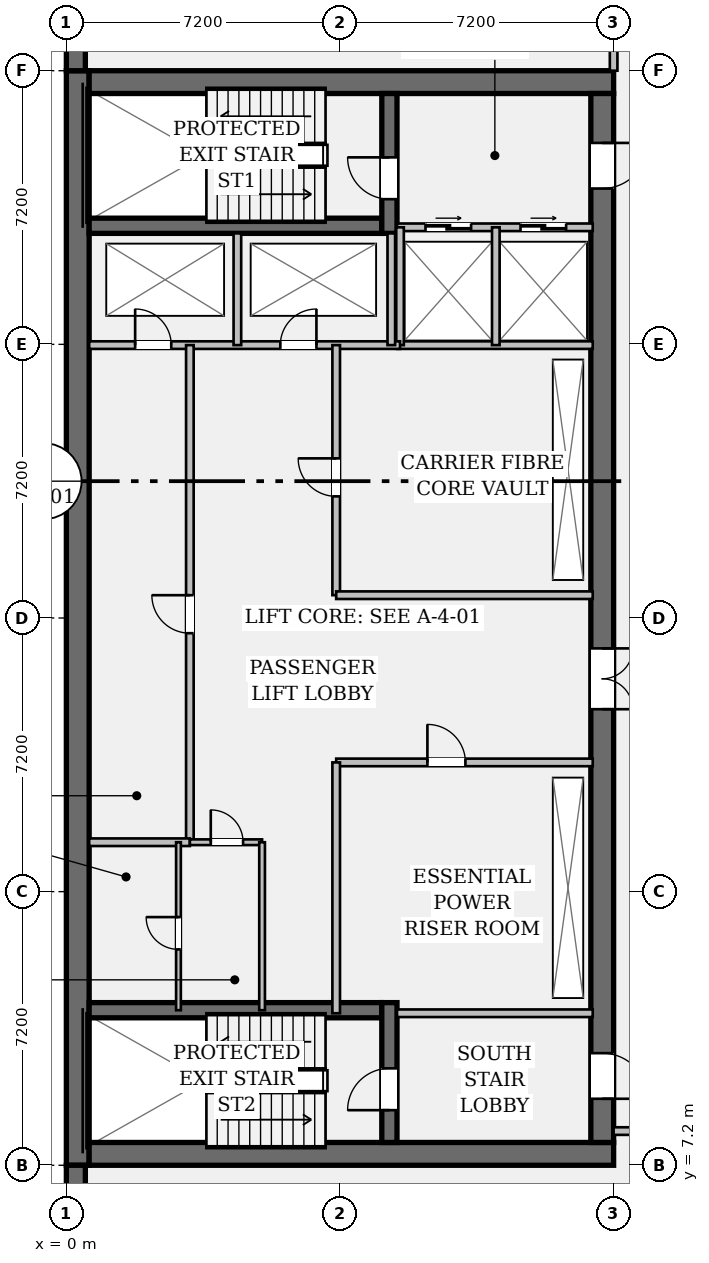
"""IFC4 building model, lengths in metres.
Left out: names, types, materials, properties, quantities, classifications, styles, units other than length and angle.
Written with IfcOpenShell. Run it as: python <this file> out.ifc"""

import sys

from ifc_helpers import new_model, si_unit, direction, frame, frame_2d, origin, place, context, subcontext, project, spatial, rectangle, extrude, element, fill, save


model = new_model("IFC4")
c1 = context("Model", 3, precision=1e-05, world=origin(), true_north=direction((0.0, 1.0)))
c2 = subcontext(c1, "Body", "Model", "MODEL_VIEW")
j1 = project(units=[si_unit("LENGTHUNIT", "METRE"), si_unit("PLANEANGLEUNIT", "RADIAN")], contexts=[c1])
p1 = place(None, origin())
s1 = spatial("IfcSite", under=j1, at=p1, CompositionType="ELEMENT")
p2 = place(p1, origin())
s2 = spatial("IfcBuilding", under=s1, at=p2, CompositionType="ELEMENT")
p3 = place(p2, frame((0.0, 0.0, -4.55)))
s3 = spatial("IfcBuildingStorey", under=s2, at=p3, CompositionType="ELEMENT", Elevation=-4.55)
p4 = place(p3, frame((0.3, 7.2, 0.0), z_axis=(0.0, 0.0, 1.0), x_axis=(0.0, 1.0, 0.0)))
e1 = element("IfcWall", 1, at=p4, inside=s3, PredefinedType="SHEAR", context=c2, shape_type="SweptSolid", body=[
    extrude(rectangle(XDim=28.8, YDim=0.6, at=frame_2d((14.4, 0.0))), origin(), (0.0, 0.0, 1.0), 4.25),
])
for number, where, z_axis, x_axis in (
    (2, (0.6, 7.5, 0.0), (0.0, 0.0, 1.0), (1.0, 0.0, 0.0)),
    (3, (0.6, 35.7, 0.0), (0.0, 0.0, 1.0), (1.0, 0.0, 0.0)),
):
    element("IfcWall", number, at=place(p3, frame(where, z_axis=z_axis, x_axis=x_axis)), inside=s3, PredefinedType="SHEAR", context=c2, shape_type="SweptSolid", body=[
        extrude(rectangle(XDim=13.8, YDim=0.6, at=frame_2d((6.9, 0.0))), origin(), (0.0, 0.0, 1.0), 4.25),
    ])
p5 = place(p3, frame((14.1, 35.4, 0.0), z_axis=(0.0, 0.0, 1.0), x_axis=(0.0, -1.0, 0.0)))
e4 = element("IfcWall", 4, at=p5, inside=s3, PredefinedType="SHEAR", context=c2, shape_type="SweptSolid", body=[
    extrude(rectangle(XDim=27.6, YDim=0.6, at=frame_2d((13.8, 0.0))), origin(), (0.0, 0.0, 1.0), 4.25),
])
p6 = place(p5, frame((1.3, 0.0, 0.0)))
e5 = element("IfcOpeningElement", 5, at=p6, cuts=e4, PredefinedType="OPENING", context=c2, shape_type="SweptSolid", body=[
    extrude(rectangle(XDim=1.2, YDim=2.15, at=frame_2d((0.6, 1.075))), frame((0.0, 0.312, 0.0), z_axis=(0.0, -1.0, 0.0), x_axis=(1.0, 0.0, 0.0)), (0.0, 0.0, 1.0), 0.624),
])
p7 = place(p5, frame((25.25, 0.0, 0.0)))
e6 = element("IfcOpeningElement", 6, at=p7, cuts=e4, PredefinedType="OPENING", context=c2, shape_type="SweptSolid", body=[
    extrude(rectangle(XDim=1.2, YDim=2.15, at=frame_2d((0.6, 1.075))), frame((0.0, 0.312, 0.0), z_axis=(0.0, -1.0, 0.0), x_axis=(1.0, 0.0, 0.0)), (0.0, 0.0, 1.0), 0.624),
])
p8 = place(p5, frame((14.6, 0.0, 0.0)))
e7 = element("IfcOpeningElement", 7, at=p8, cuts=e4, PredefinedType="OPENING", context=c2, shape_type="SweptSolid", body=[
    extrude(rectangle(XDim=1.6, YDim=2.2, at=frame_2d((0.8, 1.1))), frame((0.0, 0.312, 0.0), z_axis=(0.0, -1.0, 0.0), x_axis=(1.0, 0.0, 0.0)), (0.0, 0.0, 1.0), 0.624),
])
for number, where, z_axis, x_axis in (
    (8, (0.6, 31.92, 0.0), (0.0, 0.0, 1.0), (1.0, 0.0, 0.0)),
    (9, (0.6, 11.28, 0.0), (0.0, 0.0, 1.0), (1.0, 0.0, 0.0)),
):
    element("IfcWall", number, at=place(p3, frame(where, z_axis=z_axis, x_axis=x_axis)), inside=s3, PredefinedType="SHEAR", context=c2, shape_type="SweptSolid", body=[
        extrude(rectangle(XDim=7.7, YDim=0.4, at=frame_2d((3.85, 0.0))), origin(), (0.0, 0.0, 1.0), 4.25),
    ])
p9 = place(p3, frame((8.5, 31.72, 0.0), z_axis=(0.0, 0.0, 1.0), x_axis=(0.0, 1.0, 0.0)))
e10 = element("IfcWall", 10, at=p9, inside=s3, PredefinedType="SHEAR", context=c2, shape_type="SweptSolid", body=[
    extrude(rectangle(XDim=3.68, YDim=0.4, at=frame_2d((1.84, 0.0))), origin(), (0.0, 0.0, 1.0), 4.25),
])
p10 = place(p9, frame((0.9, 0.0, 0.0)))
e11 = element("IfcOpeningElement", 11, at=p10, cuts=e10, PredefinedType="OPENING", context=c2, shape_type="SweptSolid", body=[
    extrude(rectangle(XDim=1.1, YDim=2.15, at=frame_2d((0.55, 1.075))), frame((0.0, 0.212, 0.0), z_axis=(0.0, -1.0, 0.0), x_axis=(1.0, 0.0, 0.0)), (0.0, 0.0, 1.0), 0.424),
])
p11 = place(p3, frame((8.5, 7.8, 0.0), z_axis=(0.0, 0.0, 1.0), x_axis=(0.0, 1.0, 0.0)))
e12 = element("IfcWall", 12, at=p11, inside=s3, PredefinedType="SHEAR", context=c2, shape_type="SweptSolid", body=[
    extrude(rectangle(XDim=3.68, YDim=0.4, at=frame_2d((1.84, 0.0))), origin(), (0.0, 0.0, 1.0), 4.25),
])
p12 = place(p11, frame((0.85, 0.0, 0.0)))
e13 = element("IfcOpeningElement", 13, at=p12, cuts=e12, PredefinedType="OPENING", context=c2, shape_type="SweptSolid", body=[
    extrude(rectangle(XDim=1.1, YDim=2.15, at=frame_2d((0.55, 1.075))), frame((0.0, 0.212, 0.0), z_axis=(0.0, -1.0, 0.0), x_axis=(1.0, 0.0, 0.0)), (0.0, 0.0, 1.0), 0.424),
])
p13 = place(p3, frame((0.25, 3.2, 0.0), z_axis=(0.0, 0.0, 1.0), x_axis=(0.0, 1.0, 0.0)))
e14 = element("IfcWall", 14, at=p13, inside=s3, PredefinedType="SOLIDWALL", context=c2, shape_type="SweptSolid", body=[
    extrude(rectangle(XDim=4.0, YDim=0.5, at=frame_2d((2.0, 0.0))), origin(), (0.0, 0.0, 1.0), 4.25),
])
p14 = place(p3, frame((0.25, 36.0, 0.0), z_axis=(0.0, 0.0, 1.0), x_axis=(0.0, 1.0, 0.0)))
e15 = element("IfcWall", 15, at=p14, inside=s3, PredefinedType="SOLIDWALL", context=c2, shape_type="SweptSolid", body=[
    extrude(rectangle(XDim=11.2, YDim=0.5, at=frame_2d((5.6, 0.0))), origin(), (0.0, 0.0, 1.0), 4.25),
])
p15 = place(p3, frame((8.7, 31.88, 0.0), z_axis=(0.0, 0.0, 1.0), x_axis=(1.0, 0.0, 0.0)))
e16 = element("IfcWall", 16, at=p15, inside=s3, PredefinedType="PARTITIONING", context=c2, shape_type="SweptSolid", body=[
    extrude(rectangle(XDim=5.15, YDim=0.2, at=frame_2d((2.575, 0.0))), origin(), (0.0, 0.0, 1.0), 4.25),
])
p16 = place(p15, frame((0.75, 0.0, 0.0)))
e17 = element("IfcOpeningElement", 17, at=p16, cuts=e16, PredefinedType="OPENING", context=c2, shape_type="SweptSolid", body=[
    extrude(rectangle(XDim=1.2, YDim=2.2, at=frame_2d((0.6, 1.1))), frame((0.0, 0.112, 0.0), z_axis=(0.0, -1.0, 0.0), x_axis=(1.0, 0.0, 0.0)), (0.0, 0.0, 1.0), 0.224),
])
p17 = place(p15, frame((3.25, 0.0, 0.0)))
e18 = element("IfcOpeningElement", 18, at=p17, cuts=e16, PredefinedType="OPENING", context=c2, shape_type="SweptSolid", body=[
    extrude(rectangle(XDim=1.2, YDim=2.2, at=frame_2d((0.6, 1.1))), frame((0.0, 0.112, 0.0), z_axis=(0.0, -1.0, 0.0), x_axis=(1.0, 0.0, 0.0)), (0.0, 0.0, 1.0), 0.224),
])
for number, where, z_axis, x_axis in (
    (19, (8.7, 11.2, 0.0), (0.0, 0.0, 1.0), (1.0, 0.0, 0.0)),
    (20, (8.7, 28.78, 0.0), (0.0, 0.0, 1.0), (1.0, 0.0, 0.0)),
):
    element("IfcWall", number, at=place(p3, frame(where, z_axis=z_axis, x_axis=x_axis)), inside=s3, PredefinedType="PARTITIONING", context=c2, shape_type="SweptSolid", body=[
        extrude(rectangle(XDim=5.15, YDim=0.2, at=frame_2d((2.575, 0.0))), origin(), (0.0, 0.0, 1.0), 4.25),
    ])
for number, where, z_axis, x_axis in (
    (21, (8.78, 28.78, 0.0), (0.0, 0.0, 1.0), (0.0, 1.0, 0.0)),
    (22, (11.3, 28.78, 0.0), (0.0, 0.0, 1.0), (0.0, 1.0, 0.0)),
):
    element("IfcWall", number, at=place(p3, frame(where, z_axis=z_axis, x_axis=x_axis)), inside=s3, PredefinedType="PARTITIONING", context=c2, shape_type="SweptSolid", body=[
        extrude(rectangle(XDim=3.1, YDim=0.2, at=frame_2d((1.55, 0.0))), origin(), (0.0, 0.0, 1.0), 4.25),
    ])
p18 = place(p3, frame((0.6, 28.78, 0.0), z_axis=(0.0, 0.0, 1.0), x_axis=(1.0, 0.0, 0.0)))
e23 = element("IfcWall", 23, at=p18, inside=s3, PredefinedType="PARTITIONING", context=c2, shape_type="SweptSolid", body=[
    extrude(rectangle(XDim=8.18, YDim=0.2, at=frame_2d((4.09, 0.0))), origin(), (0.0, 0.0, 1.0), 4.25),
])
p19 = place(p18, frame((1.21, 0.0, 0.0)))
e24 = element("IfcOpeningElement", 24, at=p19, cuts=e23, PredefinedType="OPENING", context=c2, shape_type="SweptSolid", body=[
    extrude(rectangle(XDim=0.95, YDim=2.15, at=frame_2d((0.475, 1.075))), frame((0.0, 0.112, 0.0), z_axis=(0.0, -1.0, 0.0), x_axis=(1.0, 0.0, 0.0)), (0.0, 0.0, 1.0), 0.224),
])
p20 = place(p18, frame((5.03, 0.0, 0.0)))
e25 = element("IfcOpeningElement", 25, at=p20, cuts=e23, PredefinedType="OPENING", context=c2, shape_type="SweptSolid", body=[
    extrude(rectangle(XDim=0.95, YDim=2.15, at=frame_2d((0.475, 1.075))), frame((0.0, 0.112, 0.0), z_axis=(0.0, -1.0, 0.0), x_axis=(1.0, 0.0, 0.0)), (0.0, 0.0, 1.0), 0.224),
])
for number, where, z_axis, x_axis in (
    (26, (4.5, 28.78, 0.0), (0.0, 0.0, 1.0), (0.0, 1.0, 0.0)),
    (27, (8.55, 28.78, 0.0), (0.0, 0.0, 1.0), (0.0, 1.0, 0.0)),
):
    element("IfcWall", number, at=place(p3, frame(where, z_axis=z_axis, x_axis=x_axis)), inside=s3, PredefinedType="PARTITIONING", context=c2, shape_type="SweptSolid", body=[
        extrude(rectangle(XDim=2.94, YDim=0.2, at=frame_2d((1.47, 0.0))), origin(), (0.0, 0.0, 1.0), 4.25),
    ])
p21 = place(p3, frame((3.25, 15.7, 0.0), z_axis=(0.0, 0.0, 1.0), x_axis=(0.0, 1.0, 0.0)))
e28 = element("IfcWall", 28, at=p21, inside=s3, PredefinedType="PARTITIONING", context=c2, shape_type="SweptSolid", body=[
    extrude(rectangle(XDim=13.08, YDim=0.2, at=frame_2d((6.54, 0.0))), origin(), (0.0, 0.0, 1.0), 4.25),
])
p22 = place(p21, frame((5.5, 0.0, 0.0)))
e29 = element("IfcOpeningElement", 29, at=p22, cuts=e28, PredefinedType="OPENING", context=c2, shape_type="SweptSolid", body=[
    extrude(rectangle(XDim=1.0, YDim=2.15, at=frame_2d((0.5, 1.075))), frame((0.0, 0.112, 0.0), z_axis=(0.0, -1.0, 0.0), x_axis=(1.0, 0.0, 0.0)), (0.0, 0.0, 1.0), 0.224),
])
p23 = place(p3, frame((0.6, 15.7, 0.0), z_axis=(0.0, 0.0, 1.0), x_axis=(1.0, 0.0, 0.0)))
e30 = element("IfcWall", 30, at=p23, inside=s3, PredefinedType="PARTITIONING", context=c2, shape_type="SweptSolid", body=[
    extrude(rectangle(XDim=2.65, YDim=0.2, at=frame_2d((1.325, 0.0))), origin(), (0.0, 0.0, 1.0), 4.25),
])
p24 = place(p3, frame((7.1, 22.2, 0.0), z_axis=(0.0, 0.0, 1.0), x_axis=(0.0, 1.0, 0.0)))
e31 = element("IfcWall", 31, at=p24, inside=s3, PredefinedType="PARTITIONING", context=c2, shape_type="SweptSolid", body=[
    extrude(rectangle(XDim=6.58, YDim=0.2, at=frame_2d((3.29, 0.0))), origin(), (0.0, 0.0, 1.0), 4.25),
])
p25 = place(p24, frame((2.6, 0.0, 0.0)))
e32 = element("IfcOpeningElement", 32, at=p25, cuts=e31, PredefinedType="OPENING", context=c2, shape_type="SweptSolid", body=[
    extrude(rectangle(XDim=1.0, YDim=2.15, at=frame_2d((0.5, 1.075))), frame((0.0, 0.112, 0.0), z_axis=(0.0, -1.0, 0.0), x_axis=(1.0, 0.0, 0.0)), (0.0, 0.0, 1.0), 0.224),
])
p26 = place(p3, frame((7.1, 22.2, 0.0), z_axis=(0.0, 0.0, 1.0), x_axis=(1.0, 0.0, 0.0)))
e33 = element("IfcWall", 33, at=p26, inside=s3, PredefinedType="PARTITIONING", context=c2, shape_type="SweptSolid", body=[
    extrude(rectangle(XDim=6.75, YDim=0.2, at=frame_2d((3.375, 0.0))), origin(), (0.0, 0.0, 1.0), 4.25),
])
p27 = place(p3, frame((7.1, 17.8, 0.0), z_axis=(0.0, 0.0, 1.0), x_axis=(1.0, 0.0, 0.0)))
e34 = element("IfcWall", 34, at=p27, inside=s3, PredefinedType="PARTITIONING", context=c2, shape_type="SweptSolid", body=[
    extrude(rectangle(XDim=6.75, YDim=0.2, at=frame_2d((3.375, 0.0))), origin(), (0.0, 0.0, 1.0), 4.25),
])
p28 = place(p27, frame((2.4, 0.0, 0.0)))
e35 = element("IfcOpeningElement", 35, at=p28, cuts=e34, PredefinedType="OPENING", context=c2, shape_type="SweptSolid", body=[
    extrude(rectangle(XDim=1.0, YDim=2.15, at=frame_2d((0.5, 1.075))), frame((0.0, 0.112, 0.0), z_axis=(0.0, -1.0, 0.0), x_axis=(1.0, 0.0, 0.0)), (0.0, 0.0, 1.0), 0.224),
])
p29 = place(p3, frame((7.1, 11.2, 0.0), z_axis=(0.0, 0.0, 1.0), x_axis=(0.0, 1.0, 0.0)))
e36 = element("IfcWall", 36, at=p29, inside=s3, PredefinedType="PARTITIONING", context=c2, shape_type="SweptSolid", body=[
    extrude(rectangle(XDim=6.6, YDim=0.2, at=frame_2d((3.3, 0.0))), origin(), (0.0, 0.0, 1.0), 4.25),
])
p30 = place(p3, frame((3.25, 15.7, 0.0), z_axis=(0.0, 0.0, 1.0), x_axis=(1.0, 0.0, 0.0)))
e37 = element("IfcWall", 37, at=p30, inside=s3, PredefinedType="PARTITIONING", context=c2, shape_type="SweptSolid", body=[
    extrude(rectangle(XDim=1.9, YDim=0.15, at=frame_2d((0.95, 0.0))), origin(), (0.0, 0.0, 1.0), 4.25),
])
p31 = place(p30, frame((0.55, 0.0, 0.0)))
e38 = element("IfcOpeningElement", 38, at=p31, cuts=e37, PredefinedType="OPENING", context=c2, shape_type="SweptSolid", body=[
    extrude(rectangle(XDim=0.85, YDim=2.15, at=frame_2d((0.425, 1.075))), frame((0.0, 0.087, 0.0), z_axis=(0.0, -1.0, 0.0), x_axis=(1.0, 0.0, 0.0)), (0.0, 0.0, 1.0), 0.174),
])
p32 = place(p3, frame((5.15, 11.28, 0.0), z_axis=(0.0, 0.0, 1.0), x_axis=(0.0, 1.0, 0.0)))
e39 = element("IfcWall", 39, at=p32, inside=s3, PredefinedType="PARTITIONING", context=c2, shape_type="SweptSolid", body=[
    extrude(rectangle(XDim=4.42, YDim=0.15, at=frame_2d((2.21, 0.0))), origin(), (0.0, 0.0, 1.0), 4.25),
])
p33 = place(p3, frame((2.95, 11.28, 0.0), z_axis=(0.0, 0.0, 1.0), x_axis=(0.0, 1.0, 0.0)))
e40 = element("IfcWall", 40, at=p33, inside=s3, PredefinedType="PARTITIONING", context=c2, shape_type="SweptSolid", body=[
    extrude(rectangle(XDim=4.42, YDim=0.125, at=frame_2d((2.21, 0.0))), origin(), (0.0, 0.0, 1.0), 4.25),
])
p34 = place(p33, frame((1.6, 0.0, 0.0)))
e41 = element("IfcOpeningElement", 41, at=p34, cuts=e40, PredefinedType="OPENING", context=c2, shape_type="SweptSolid", body=[
    extrude(rectangle(XDim=0.85, YDim=2.15, at=frame_2d((0.425, 1.075))), frame((0.0, 0.074, 0.0), z_axis=(0.0, -1.0, 0.0), x_axis=(1.0, 0.0, 0.0)), (0.0, 0.0, 1.0), 0.149),
])
p35 = place(p3, frame((14.4, 8.1, 0.0), z_axis=(0.0, 0.0, 1.0), x_axis=(1.0, 0.0, 0.0)))
e42 = element("IfcWall", 42, at=p35, inside=s3, PredefinedType="PARTITIONING", context=c2, shape_type="SweptSolid", body=[
    extrude(rectangle(XDim=3.05, YDim=0.2, at=frame_2d((1.525, 0.0))), origin(), (0.0, 0.0, 1.0), 3.288),
])
p36 = place(p35, frame((1.05, 0.0, 0.0)))
e43 = element("IfcOpeningElement", 43, at=p36, cuts=e42, PredefinedType="OPENING", context=c2, shape_type="SweptSolid", body=[
    extrude(rectangle(XDim=1.1, YDim=2.15, at=frame_2d((0.55, 1.075))), frame((0.0, 0.112, 0.0), z_axis=(0.0, -1.0, 0.0), x_axis=(1.0, 0.0, 0.0)), (0.0, 0.0, 1.0), 0.224),
])
p37 = place(p3, frame((14.4, 36.0, 0.0), z_axis=(0.0, 0.0, 1.0), x_axis=(0.0, 1.0, 0.0)))
e44 = element("IfcWall", 44, at=p37, inside=s3, PredefinedType="PARTITIONING", context=c2, shape_type="SweptSolid", body=[
    extrude(rectangle(XDim=7.9, YDim=0.2, at=frame_2d((3.95, 0.0))), origin(), (0.0, 0.0, 1.0), 3.288),
])
p38 = place(p37, frame((2.4, 0.0, 0.0)))
e45 = element("IfcOpeningElement", 45, at=p38, cuts=e44, PredefinedType="OPENING", context=c2, shape_type="SweptSolid", body=[
    extrude(rectangle(XDim=1.2, YDim=2.15, at=frame_2d((0.6, 1.075))), frame((0.0, 0.112, 0.0), z_axis=(0.0, -1.0, 0.0), x_axis=(1.0, 0.0, 0.0)), (0.0, 0.0, 1.0), 0.224),
])
p39 = place(p10, origin())
e46 = element("IfcDoor", 46, at=p39, inside=s3, OperationType="SINGLE_SWING_RIGHT", PredefinedType="DOOR", context=c2, shape_type="SweptSolid", body=[
    extrude(rectangle(XDim=1.1, YDim=2.15, at=frame_2d((0.55, 1.075))), frame((0.0, 0.025, 0.0), z_axis=(0.0, -1.0, 0.0), x_axis=(1.0, 0.0, 0.0)), (0.0, 0.0, 1.0), 0.05),
])
fill(e11, e46)
p40 = place(p6, origin())
e47 = element("IfcDoor", 47, at=p40, inside=s3, OperationType="SINGLE_SWING_LEFT", PredefinedType="DOOR", context=c2, shape_type="SweptSolid", body=[
    extrude(rectangle(XDim=1.2, YDim=2.15, at=frame_2d((0.6, 1.075))), frame((0.0, 0.025, 0.0), z_axis=(0.0, -1.0, 0.0), x_axis=(1.0, 0.0, 0.0)), (0.0, 0.0, 1.0), 0.05),
])
fill(e5, e47)
p41 = place(p12, origin())
e48 = element("IfcDoor", 48, at=p41, inside=s3, OperationType="SINGLE_SWING_LEFT", PredefinedType="DOOR", context=c2, shape_type="SweptSolid", body=[
    extrude(rectangle(XDim=1.1, YDim=2.15, at=frame_2d((0.55, 1.075))), frame((0.0, 0.025, 0.0), z_axis=(0.0, -1.0, 0.0), x_axis=(1.0, 0.0, 0.0)), (0.0, 0.0, 1.0), 0.05),
])
fill(e13, e48)
p42 = place(p7, origin())
e49 = element("IfcDoor", 49, at=p42, inside=s3, OperationType="SINGLE_SWING_RIGHT", PredefinedType="DOOR", context=c2, shape_type="SweptSolid", body=[
    extrude(rectangle(XDim=1.2, YDim=2.15, at=frame_2d((0.6, 1.075))), frame((0.0, 0.025, 0.0), z_axis=(0.0, -1.0, 0.0), x_axis=(1.0, 0.0, 0.0)), (0.0, 0.0, 1.0), 0.05),
])
fill(e6, e49)
p43 = place(p16, origin())
e50 = element("IfcDoor", 50, at=p43, inside=s3, OperationType="DOUBLE_DOOR_SLIDING", PredefinedType="DOOR", context=c2, shape_type="SweptSolid", body=[
    extrude(rectangle(XDim=1.2, YDim=2.2, at=frame_2d((0.6, 1.1))), frame((0.0, 0.025, 0.0), z_axis=(0.0, -1.0, 0.0), x_axis=(1.0, 0.0, 0.0)), (0.0, 0.0, 1.0), 0.05),
])
fill(e17, e50)
p44 = place(p17, origin())
e51 = element("IfcDoor", 51, at=p44, inside=s3, OperationType="DOUBLE_DOOR_SLIDING", PredefinedType="DOOR", context=c2, shape_type="SweptSolid", body=[
    extrude(rectangle(XDim=1.2, YDim=2.2, at=frame_2d((0.6, 1.1))), frame((0.0, 0.025, 0.0), z_axis=(0.0, -1.0, 0.0), x_axis=(1.0, 0.0, 0.0)), (0.0, 0.0, 1.0), 0.05),
])
fill(e18, e51)
p45 = place(p19, origin())
e52 = element("IfcDoor", 52, at=p45, inside=s3, OperationType="SINGLE_SWING_LEFT", PredefinedType="DOOR", context=c2, shape_type="SweptSolid", body=[
    extrude(rectangle(XDim=0.95, YDim=2.15, at=frame_2d((0.475, 1.075))), frame((0.0, 0.025, 0.0), z_axis=(0.0, -1.0, 0.0), x_axis=(1.0, 0.0, 0.0)), (0.0, 0.0, 1.0), 0.05),
])
fill(e24, e52)
p46 = place(p20, origin())
e53 = element("IfcDoor", 53, at=p46, inside=s3, OperationType="SINGLE_SWING_RIGHT", PredefinedType="DOOR", context=c2, shape_type="SweptSolid", body=[
    extrude(rectangle(XDim=0.95, YDim=2.15, at=frame_2d((0.475, 1.075))), frame((0.0, 0.025, 0.0), z_axis=(0.0, -1.0, 0.0), x_axis=(1.0, 0.0, 0.0)), (0.0, 0.0, 1.0), 0.05),
])
fill(e25, e53)
p47 = place(p8, origin())
e54 = element("IfcDoor", 54, at=p47, inside=s3, OperationType="DOUBLE_DOOR_SINGLE_SWING", PredefinedType="DOOR", context=c2, shape_type="SweptSolid", body=[
    extrude(rectangle(XDim=1.6, YDim=2.2, at=frame_2d((0.8, 1.1))), frame((0.0, 0.025, 0.0), z_axis=(0.0, -1.0, 0.0), x_axis=(1.0, 0.0, 0.0)), (0.0, 0.0, 1.0), 0.05),
])
fill(e7, e54)
p48 = place(p22, origin())
e55 = element("IfcDoor", 55, at=p48, inside=s3, OperationType="SINGLE_SWING_RIGHT", PredefinedType="DOOR", context=c2, shape_type="SweptSolid", body=[
    extrude(rectangle(XDim=1.0, YDim=2.15, at=frame_2d((0.5, 1.075))), frame((0.0, 0.025, 0.0), z_axis=(0.0, -1.0, 0.0), x_axis=(1.0, 0.0, 0.0)), (0.0, 0.0, 1.0), 0.05),
])
fill(e29, e55)
p49 = place(p25, origin())
e56 = element("IfcDoor", 56, at=p49, inside=s3, OperationType="SINGLE_SWING_RIGHT", PredefinedType="DOOR", context=c2, shape_type="SweptSolid", body=[
    extrude(rectangle(XDim=1.0, YDim=2.15, at=frame_2d((0.5, 1.075))), frame((0.0, 0.025, 0.0), z_axis=(0.0, -1.0, 0.0), x_axis=(1.0, 0.0, 0.0)), (0.0, 0.0, 1.0), 0.05),
])
fill(e32, e56)
p50 = place(p28, origin())
e57 = element("IfcDoor", 57, at=p50, inside=s3, OperationType="SINGLE_SWING_LEFT", PredefinedType="DOOR", context=c2, shape_type="SweptSolid", body=[
    extrude(rectangle(XDim=1.0, YDim=2.15, at=frame_2d((0.5, 1.075))), frame((0.0, 0.025, 0.0), z_axis=(0.0, -1.0, 0.0), x_axis=(1.0, 0.0, 0.0)), (0.0, 0.0, 1.0), 0.05),
])
fill(e35, e57)
p51 = place(p31, origin())
e58 = element("IfcDoor", 58, at=p51, inside=s3, OperationType="SINGLE_SWING_LEFT", PredefinedType="DOOR", context=c2, shape_type="SweptSolid", body=[
    extrude(rectangle(XDim=0.85, YDim=2.15, at=frame_2d((0.425, 1.075))), frame((0.0, 0.025, 0.0), z_axis=(0.0, -1.0, 0.0), x_axis=(1.0, 0.0, 0.0)), (0.0, 0.0, 1.0), 0.05),
])
fill(e38, e58)
p52 = place(p34, origin())
e59 = element("IfcDoor", 59, at=p52, inside=s3, OperationType="SINGLE_SWING_RIGHT", PredefinedType="DOOR", context=c2, shape_type="SweptSolid", body=[
    extrude(rectangle(XDim=0.85, YDim=2.15, at=frame_2d((0.425, 1.075))), frame((0.0, 0.025, 0.0), z_axis=(0.0, -1.0, 0.0), x_axis=(1.0, 0.0, 0.0)), (0.0, 0.0, 1.0), 0.05),
])
fill(e41, e59)
save(model, sys.argv[1])
